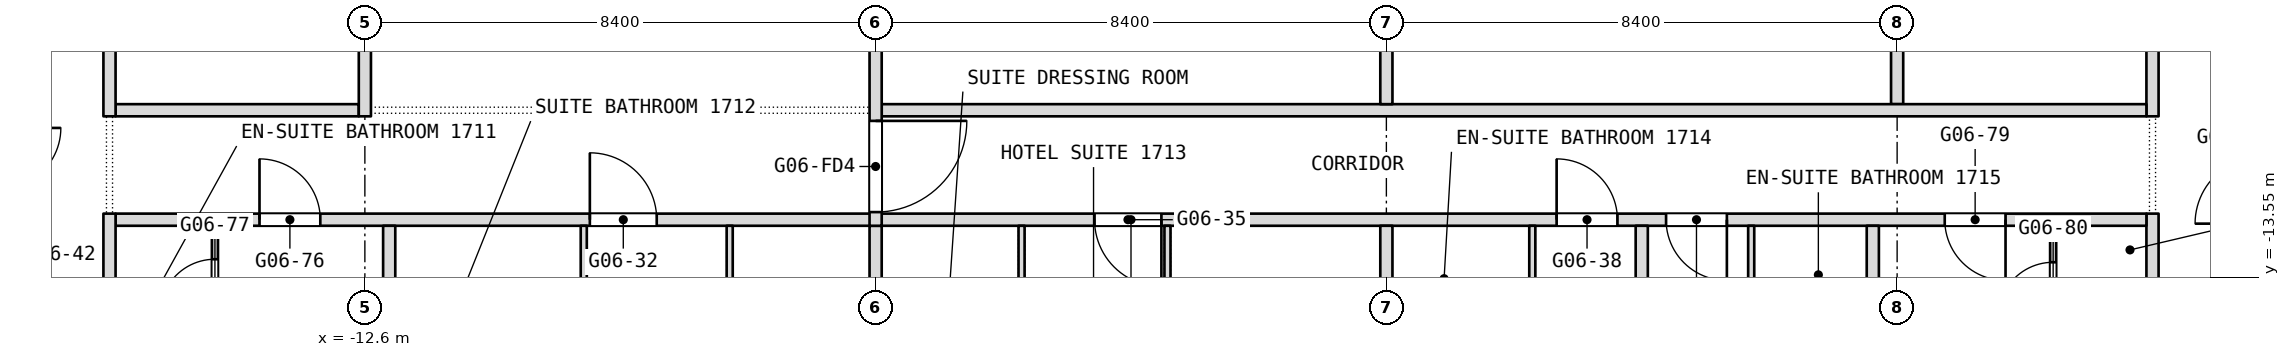
"""IFC4 building model, lengths in metres.
Left out: names, types, materials, properties, quantities, classifications, styles, units other than length and angle.
Written with IfcOpenShell. Run it as: python <this file> out.ifc"""

import sys

from ifc_helpers import new_model, si_unit, direction, frame, frame_2d, origin, place, context, subcontext, project, spatial, rectangle, extrude, element, fill, save


model = new_model("IFC4")
c1 = context("Model", 3, precision=1e-05, world=origin(), true_north=direction((0.0, 1.0)))
c2 = subcontext(c1, "Body", "Model", "MODEL_VIEW")
j1 = project(units=[si_unit("LENGTHUNIT", "METRE"), si_unit("PLANEANGLEUNIT", "RADIAN")], contexts=[c1])
p1 = place(None, origin())
s1 = spatial("IfcSite", under=j1, at=p1, CompositionType="ELEMENT")
p2 = place(p1, origin())
s2 = spatial("IfcBuilding", under=s1, at=p2, CompositionType="ELEMENT")
p3 = place(p2, frame((0.0, 0.0, 76.1)))
s3 = spatial("IfcBuildingStorey", under=s2, at=p3, CompositionType="ELEMENT", Elevation=76.1)
p4 = place(p3, frame((16.8, -17.143, 0.0), z_axis=(0.0, 0.0, 1.0), x_axis=(0.0, 1.0, 0.0)))
e1 = element("IfcWall", 1, at=p4, inside=s3, PredefinedType="PARTITIONING", context=c2, shape_type="SweptSolid", body=[
    extrude(rectangle(XDim=4.643, YDim=0.2, at=frame_2d((2.322, 0.0))), origin(), (0.0, 0.0, 1.0), 3.34),
])
p5 = place(p4, frame((0.772, 0.0, 0.0)))
e2 = element("IfcOpeningElement", 2, at=p5, cuts=e1, PredefinedType="OPENING", context=c2, shape_type="SweptSolid", body=[
    extrude(rectangle(XDim=0.9, YDim=2.1, at=frame_2d((0.45, 1.05))), frame((0.0, 0.1, 0.0), z_axis=(0.0, -1.0, 0.0), x_axis=(1.0, 0.0, 0.0)), (0.0, 0.0, 1.0), 0.2),
])
p6 = place(p3, frame((16.8, -10.9, 0.0), z_axis=(0.0, 0.0, 1.0), x_axis=(0.0, 1.0, 0.0)))
e3 = element("IfcWall", 3, at=p6, inside=s3, PredefinedType="PARTITIONING", context=c2, shape_type="SweptSolid", body=[
    extrude(rectangle(XDim=7.3, YDim=0.2, at=frame_2d((3.65, 0.0))), origin(), (0.0, 0.0, 1.0), 3.34),
])
p7 = place(p6, frame((3.15, 0.0, 0.0)))
e4 = element("IfcOpeningElement", 4, at=p7, cuts=e3, PredefinedType="OPENING", context=c2, shape_type="SweptSolid", body=[
    extrude(rectangle(XDim=1.0, YDim=2.1, at=frame_2d((0.5, 1.05))), frame((0.0, 0.1, 0.0), z_axis=(0.0, -1.0, 0.0), x_axis=(1.0, 0.0, 0.0)), (0.0, 0.0, 1.0), 0.2),
])
p8 = place(p3, frame((15.166, -15.0, 0.0), z_axis=(0.0, 0.0, 1.0), x_axis=(0.0, 1.0, 0.0)))
e5 = element("IfcWall", 5, at=p8, inside=s3, PredefinedType="PARTITIONING", context=c2, shape_type="SweptSolid", body=[
    extrude(rectangle(XDim=2.3, YDim=0.1, at=frame_2d((1.15, 0.0))), origin(), (0.0, 0.0, 1.0), 3.34),
])
p9 = place(p8, frame((0.8, 0.0, 0.0)))
e6 = element("IfcOpeningElement", 6, at=p9, cuts=e5, PredefinedType="OPENING", context=c2, shape_type="SweptSolid", body=[
    extrude(rectangle(XDim=0.9, YDim=2.1, at=frame_2d((0.45, 1.05))), frame((0.0, 0.05, 0.0), z_axis=(0.0, -1.0, 0.0), x_axis=(1.0, 0.0, 0.0)), (0.0, 0.0, 1.0), 0.1),
])
p10 = place(p3, frame((12.6, -10.7, 0.0), z_axis=(0.0, 0.0, 1.0), x_axis=(0.0, 1.0, 0.0)))
e7 = element("IfcWall", 7, at=p10, inside=s3, PredefinedType="PARTITIONING", context=c2, shape_type="SweptSolid", body=[
    extrude(rectangle(XDim=3.6, YDim=0.2, at=frame_2d((1.8, 0.0))), origin(), (0.0, 0.0, 1.0), 3.34),
])
p11 = place(p3, frame((-16.7, -12.6, 0.0), z_axis=(0.0, 0.0, 1.0), x_axis=(1.0, 0.0, 0.0)))
e8 = element("IfcWall", 8, at=p11, inside=s3, PredefinedType="PARTITIONING", context=c2, shape_type="SweptSolid", body=[
    extrude(rectangle(XDim=33.4, YDim=0.2, at=frame_2d((16.7, 0.0))), origin(), (0.0, 0.0, 1.0), 3.34),
])
p12 = place(p11, frame((7.8, 0.0, 0.0)))
e9 = element("IfcOpeningElement", 9, at=p12, cuts=e8, PredefinedType="OPENING", context=c2, shape_type="SweptSolid", body=[
    extrude(rectangle(XDim=1.1, YDim=2.1, at=frame_2d((0.55, 1.05))), frame((0.0, 0.1, 0.0), z_axis=(0.0, -1.0, 0.0), x_axis=(1.0, 0.0, 0.0)), (0.0, 0.0, 1.0), 0.2),
])
p13 = place(p11, frame((16.1, 0.0, 0.0)))
e10 = element("IfcOpeningElement", 10, at=p13, cuts=e8, PredefinedType="OPENING", context=c2, shape_type="SweptSolid", body=[
    extrude(rectangle(XDim=1.1, YDim=2.1, at=frame_2d((0.55, 1.05))), frame((0.0, 0.1, 0.0), z_axis=(0.0, -1.0, 0.0), x_axis=(1.0, 0.0, 0.0)), (0.0, 0.0, 1.0), 0.2),
])
p14 = place(p11, frame((23.7, 0.0, 0.0)))
e11 = element("IfcOpeningElement", 11, at=p14, cuts=e8, PredefinedType="OPENING", context=c2, shape_type="SweptSolid", body=[
    extrude(rectangle(XDim=1.0, YDim=2.1, at=frame_2d((0.5, 1.05))), frame((0.0, 0.1, 0.0), z_axis=(0.0, -1.0, 0.0), x_axis=(1.0, 0.0, 0.0)), (0.0, 0.0, 1.0), 0.2),
])
p15 = place(p11, frame((25.5, 0.0, 0.0)))
e12 = element("IfcOpeningElement", 12, at=p15, cuts=e8, PredefinedType="OPENING", context=c2, shape_type="SweptSolid", body=[
    extrude(rectangle(XDim=1.0, YDim=2.1, at=frame_2d((0.5, 1.05))), frame((0.0, 0.1, 0.0), z_axis=(0.0, -1.0, 0.0), x_axis=(1.0, 0.0, 0.0)), (0.0, 0.0, 1.0), 0.2),
])
p16 = place(p11, frame((2.367, 0.0, 0.0)))
e13 = element("IfcOpeningElement", 13, at=p16, cuts=e8, PredefinedType="OPENING", context=c2, shape_type="SweptSolid", body=[
    extrude(rectangle(XDim=1.0, YDim=2.1, at=frame_2d((0.5, 1.05))), frame((0.0, 0.1, 0.0), z_axis=(0.0, -1.0, 0.0), x_axis=(1.0, 0.0, 0.0)), (0.0, 0.0, 1.0), 0.2),
])
p17 = place(p11, frame((30.083, 0.0, 0.0)))
e14 = element("IfcOpeningElement", 14, at=p17, cuts=e8, PredefinedType="OPENING", context=c2, shape_type="SweptSolid", body=[
    extrude(rectangle(XDim=1.0, YDim=2.1, at=frame_2d((0.5, 1.05))), frame((0.0, 0.1, 0.0), z_axis=(0.0, -1.0, 0.0), x_axis=(1.0, 0.0, 0.0)), (0.0, 0.0, 1.0), 0.2),
])
p18 = place(p3, frame((12.2, -15.325, 0.0), z_axis=(0.0, 0.0, 1.0), x_axis=(0.0, 1.0, 0.0)))
e15 = element("IfcWall", 15, at=p18, inside=s3, PredefinedType="PARTITIONING", context=c2, shape_type="SweptSolid", body=[
    extrude(rectangle(XDim=2.625, YDim=0.2, at=frame_2d((1.312, 0.0))), origin(), (0.0, 0.0, 1.0), 3.34),
])
p19 = place(p3, frame((-16.7, -10.8, 0.0), z_axis=(0.0, 0.0, 1.0), x_axis=(1.0, 0.0, 0.0)))
e16 = element("IfcWall", 16, at=p19, inside=s3, PredefinedType="PARTITIONING", context=c2, shape_type="SweptSolid", body=[
    extrude(rectangle(XDim=4.0, YDim=0.2, at=frame_2d((2.0, 0.0))), origin(), (0.0, 0.0, 1.0), 3.34),
])
p20 = place(p3, frame((-4.1, -10.8, 0.0), z_axis=(0.0, 0.0, 1.0), x_axis=(1.0, 0.0, 0.0)))
e17 = element("IfcWall", 17, at=p20, inside=s3, PredefinedType="PARTITIONING", context=c2, shape_type="SweptSolid", body=[
    extrude(rectangle(XDim=20.8, YDim=0.2, at=frame_2d((10.4, 0.0))), origin(), (0.0, 0.0, 1.0), 3.34),
])
p21 = place(p3, frame((10.2, -15.425, 0.0), z_axis=(0.0, 0.0, 1.0), x_axis=(0.0, 1.0, 0.0)))
e18 = element("IfcWall", 18, at=p21, inside=s3, PredefinedType="PARTITIONING", context=c2, shape_type="SweptSolid", body=[
    extrude(rectangle(XDim=2.725, YDim=0.1, at=frame_2d((1.363, 0.0))), origin(), (0.0, 0.0, 1.0), 3.34),
])
p22 = place(p3, frame((8.4, -17.7, 0.0), z_axis=(0.0, 0.0, 1.0), x_axis=(0.0, 1.0, 0.0)))
e19 = element("IfcWall", 19, at=p22, inside=s3, PredefinedType="PARTITIONING", context=c2, shape_type="SweptSolid", body=[
    extrude(rectangle(XDim=5.0, YDim=0.2, at=frame_2d((2.5, 0.0))), origin(), (0.0, 0.0, 1.0), 3.34),
])
p23 = place(p3, frame((6.6, -15.325, 0.0), z_axis=(0.0, 0.0, 1.0), x_axis=(0.0, 1.0, 0.0)))
e20 = element("IfcWall", 20, at=p23, inside=s3, PredefinedType="PARTITIONING", context=c2, shape_type="SweptSolid", body=[
    extrude(rectangle(XDim=2.625, YDim=0.1, at=frame_2d((1.312, 0.0))), origin(), (0.0, 0.0, 1.0), 3.34),
])
p24 = place(p3, frame((4.2, -17.7, 0.0), z_axis=(0.0, 0.0, 1.0), x_axis=(0.0, 1.0, 0.0)))
e21 = element("IfcWall", 21, at=p24, inside=s3, PredefinedType="PARTITIONING", context=c2, shape_type="SweptSolid", body=[
    extrude(rectangle(XDim=5.0, YDim=0.2, at=frame_2d((2.5, 0.0))), origin(), (0.0, 0.0, 1.0), 3.34),
])
p25 = place(p3, frame((4.2, -10.7, 0.0), z_axis=(0.0, 0.0, 1.0), x_axis=(0.0, 1.0, 0.0)))
e22 = element("IfcWall", 22, at=p25, inside=s3, PredefinedType="PARTITIONING", context=c2, shape_type="SweptSolid", body=[
    extrude(rectangle(XDim=8.8, YDim=0.2, at=frame_2d((4.4, 0.0))), origin(), (0.0, 0.0, 1.0), 3.34),
])
p26 = place(p3, frame((0.6, -16.25, 0.0), z_axis=(0.0, 0.0, 1.0), x_axis=(0.0, 1.0, 0.0)))
e23 = element("IfcWall", 23, at=p26, inside=s3, PredefinedType="PARTITIONING", context=c2, shape_type="SweptSolid", body=[
    extrude(rectangle(XDim=3.55, YDim=0.1, at=frame_2d((1.775, 0.0))), origin(), (0.0, 0.0, 1.0), 3.34),
])
p27 = place(p3, frame((-1.8, -16.15, 0.0), z_axis=(0.0, 0.0, 1.0), x_axis=(0.0, 1.0, 0.0)))
e24 = element("IfcWall", 24, at=p27, inside=s3, PredefinedType="PARTITIONING", context=c2, shape_type="SweptSolid", body=[
    extrude(rectangle(XDim=3.45, YDim=0.1, at=frame_2d((1.725, 0.0))), origin(), (0.0, 0.0, 1.0), 3.34),
])
p28 = place(p3, frame((-4.2, -17.7, 0.0), z_axis=(0.0, 0.0, 1.0), x_axis=(0.0, 1.0, 0.0)))
e25 = element("IfcWall", 25, at=p28, inside=s3, PredefinedType="PARTITIONING", context=c2, shape_type="SweptSolid", body=[
    extrude(rectangle(XDim=5.0, YDim=0.2, at=frame_2d((2.5, 0.0))), origin(), (0.0, 0.0, 1.0), 3.34),
])
p29 = place(p3, frame((-4.2, -12.7, 0.0), z_axis=(0.0, 0.0, 1.0), x_axis=(0.0, 1.0, 0.0)))
e26 = element("IfcWall", 26, at=p29, inside=s3, PredefinedType="PARTITIONING", context=c2, shape_type="SweptSolid", body=[
    extrude(rectangle(XDim=12.7, YDim=0.2, at=frame_2d((6.35, 0.0))), origin(), (0.0, 0.0, 1.0), 3.34),
])
p30 = place(p29, frame((11.05, 0.0, 0.0)))
e27 = element("IfcOpeningElement", 27, at=p30, cuts=e26, PredefinedType="OPENING", context=c2, shape_type="SweptSolid", body=[
    extrude(rectangle(XDim=1.5, YDim=2.1, at=frame_2d((0.75, 1.05))), frame((0.0, 0.1, 0.0), z_axis=(0.0, -1.0, 0.0), x_axis=(1.0, 0.0, 0.0)), (0.0, 0.0, 1.0), 0.2),
])
p31 = place(p29, frame((0.225, 0.0, 0.0)))
e28 = element("IfcOpeningElement", 28, at=p31, cuts=e26, PredefinedType="OPENING", context=c2, shape_type="SweptSolid", body=[
    extrude(rectangle(XDim=1.5, YDim=2.1, at=frame_2d((0.75, 1.05))), frame((0.0, 0.1, 0.0), z_axis=(0.0, -1.0, 0.0), x_axis=(1.0, 0.0, 0.0)), (0.0, 0.0, 1.0), 0.2),
])
p32 = place(p3, frame((-6.6, -16.25, 0.0), z_axis=(0.0, 0.0, 1.0), x_axis=(0.0, 1.0, 0.0)))
e29 = element("IfcWall", 29, at=p32, inside=s3, PredefinedType="PARTITIONING", context=c2, shape_type="SweptSolid", body=[
    extrude(rectangle(XDim=3.55, YDim=0.1, at=frame_2d((1.775, 0.0))), origin(), (0.0, 0.0, 1.0), 3.34),
])
p33 = place(p3, frame((-9.0, -16.15, 0.0), z_axis=(0.0, 0.0, 1.0), x_axis=(0.0, 1.0, 0.0)))
e30 = element("IfcWall", 30, at=p33, inside=s3, PredefinedType="PARTITIONING", context=c2, shape_type="SweptSolid", body=[
    extrude(rectangle(XDim=3.45, YDim=0.1, at=frame_2d((1.725, 0.0))), origin(), (0.0, 0.0, 1.0), 3.34),
])
p34 = place(p33, frame((0.94, 0.0, 0.0)))
e31 = element("IfcOpeningElement", 31, at=p34, cuts=e30, PredefinedType="OPENING", context=c2, shape_type="SweptSolid", body=[
    extrude(rectangle(XDim=0.9, YDim=2.1, at=frame_2d((0.45, 1.05))), frame((0.0, 0.05, 0.0), z_axis=(0.0, -1.0, 0.0), x_axis=(1.0, 0.0, 0.0)), (0.0, 0.0, 1.0), 0.1),
])
p35 = place(p3, frame((-12.2, -16.0, 0.0), z_axis=(0.0, 0.0, 1.0), x_axis=(0.0, 1.0, 0.0)))
e32 = element("IfcWall", 32, at=p35, inside=s3, PredefinedType="PARTITIONING", context=c2, shape_type="SweptSolid", body=[
    extrude(rectangle(XDim=3.3, YDim=0.2, at=frame_2d((1.65, 0.0))), origin(), (0.0, 0.0, 1.0), 3.34),
])
p36 = place(p3, frame((-12.6, -10.9, 0.0), z_axis=(0.0, 0.0, 1.0), x_axis=(0.0, 1.0, 0.0)))
e33 = element("IfcWall", 33, at=p36, inside=s3, PredefinedType="PARTITIONING", context=c2, shape_type="SweptSolid", body=[
    extrude(rectangle(XDim=5.6, YDim=0.2, at=frame_2d((2.8, 0.0))), origin(), (0.0, 0.0, 1.0), 3.34),
])
p37 = place(p3, frame((-15.066, -14.9, 0.0), z_axis=(0.0, 0.0, 1.0), x_axis=(0.0, 1.0, 0.0)))
e34 = element("IfcWall", 34, at=p37, inside=s3, PredefinedType="PARTITIONING", context=c2, shape_type="SweptSolid", body=[
    extrude(rectangle(XDim=2.2, YDim=0.1, at=frame_2d((1.1, 0.0))), origin(), (0.0, 0.0, 1.0), 3.34),
])
p38 = place(p37, frame((0.75, 0.0, 0.0)))
e35 = element("IfcOpeningElement", 35, at=p38, cuts=e34, PredefinedType="OPENING", context=c2, shape_type="SweptSolid", body=[
    extrude(rectangle(XDim=0.9, YDim=2.1, at=frame_2d((0.45, 1.05))), frame((0.0, 0.05, 0.0), z_axis=(0.0, -1.0, 0.0), x_axis=(1.0, 0.0, 0.0)), (0.0, 0.0, 1.0), 0.1),
])
p39 = place(p3, frame((-16.8, -17.143, 0.0), z_axis=(0.0, 0.0, 1.0), x_axis=(0.0, 1.0, 0.0)))
e36 = element("IfcWall", 36, at=p39, inside=s3, PredefinedType="PARTITIONING", context=c2, shape_type="SweptSolid", body=[
    extrude(rectangle(XDim=4.643, YDim=0.2, at=frame_2d((2.322, 0.0))), origin(), (0.0, 0.0, 1.0), 3.34),
])
p40 = place(p39, frame((0.772, 0.0, 0.0)))
e37 = element("IfcOpeningElement", 37, at=p40, cuts=e36, PredefinedType="OPENING", context=c2, shape_type="SweptSolid", body=[
    extrude(rectangle(XDim=0.9, YDim=2.1, at=frame_2d((0.45, 1.05))), frame((0.0, 0.1, 0.0), z_axis=(0.0, -1.0, 0.0), x_axis=(1.0, 0.0, 0.0)), (0.0, 0.0, 1.0), 0.2),
])
p41 = place(p3, frame((-16.8, -10.9, 0.0), z_axis=(0.0, 0.0, 1.0), x_axis=(0.0, 1.0, 0.0)))
e38 = element("IfcWall", 38, at=p41, inside=s3, PredefinedType="PARTITIONING", context=c2, shape_type="SweptSolid", body=[
    extrude(rectangle(XDim=9.0, YDim=0.2, at=frame_2d((4.5, 0.0))), origin(), (0.0, 0.0, 1.0), 3.34),
])
p42 = place(p9, origin())
e39 = element("IfcDoor", 39, at=p42, inside=s3, OperationType="SINGLE_SWING_RIGHT", PredefinedType="DOOR", context=c2, shape_type="SweptSolid", body=[
    extrude(rectangle(XDim=0.9, YDim=2.1, at=frame_2d((0.45, 1.05))), frame((0.0, 0.025, 0.0), z_axis=(0.0, -1.0, 0.0), x_axis=(1.0, 0.0, 0.0)), (0.0, 0.0, 1.0), 0.05),
])
fill(e6, e39)
p43 = place(p12, origin())
e40 = element("IfcDoor", 40, at=p43, inside=s3, OperationType="SINGLE_SWING_RIGHT", PredefinedType="DOOR", context=c2, shape_type="SweptSolid", body=[
    extrude(rectangle(XDim=1.1, YDim=2.1, at=frame_2d((0.55, 1.05))), frame((0.0, 0.025, 0.0), z_axis=(0.0, -1.0, 0.0), x_axis=(1.0, 0.0, 0.0)), (0.0, 0.0, 1.0), 0.05),
])
fill(e9, e40)
p44 = place(p13, origin())
e41 = element("IfcDoor", 41, at=p44, inside=s3, OperationType="SINGLE_SWING_LEFT", PredefinedType="DOOR", context=c2, shape_type="SweptSolid", body=[
    extrude(rectangle(XDim=1.1, YDim=2.1, at=frame_2d((0.55, 1.05))), frame((0.0, 0.025, 0.0), z_axis=(0.0, -1.0, 0.0), x_axis=(1.0, 0.0, 0.0)), (0.0, 0.0, 1.0), 0.05),
])
fill(e10, e41)
p45 = place(p14, origin())
e42 = element("IfcDoor", 42, at=p45, inside=s3, OperationType="SINGLE_SWING_RIGHT", PredefinedType="DOOR", context=c2, shape_type="SweptSolid", body=[
    extrude(rectangle(XDim=1.0, YDim=2.1, at=frame_2d((0.5, 1.05))), frame((0.0, 0.025, 0.0), z_axis=(0.0, -1.0, 0.0), x_axis=(1.0, 0.0, 0.0)), (0.0, 0.0, 1.0), 0.05),
])
fill(e11, e42)
p46 = place(p15, origin())
e43 = element("IfcDoor", 43, at=p46, inside=s3, OperationType="SINGLE_SWING_RIGHT", PredefinedType="DOOR", context=c2, shape_type="SweptSolid", body=[
    extrude(rectangle(XDim=1.0, YDim=2.1, at=frame_2d((0.5, 1.05))), frame((0.0, 0.025, 0.0), z_axis=(0.0, -1.0, 0.0), x_axis=(1.0, 0.0, 0.0)), (0.0, 0.0, 1.0), 0.05),
])
fill(e12, e43)
p47 = place(p16, origin())
e44 = element("IfcDoor", 44, at=p47, inside=s3, OperationType="SINGLE_SWING_RIGHT", PredefinedType="DOOR", context=c2, shape_type="SweptSolid", body=[
    extrude(rectangle(XDim=1.0, YDim=2.1, at=frame_2d((0.5, 1.05))), frame((0.0, 0.025, 0.0), z_axis=(0.0, -1.0, 0.0), x_axis=(1.0, 0.0, 0.0)), (0.0, 0.0, 1.0), 0.05),
])
fill(e13, e44)
p48 = place(p17, origin())
e45 = element("IfcDoor", 45, at=p48, inside=s3, OperationType="SINGLE_SWING_LEFT", PredefinedType="DOOR", context=c2, shape_type="SweptSolid", body=[
    extrude(rectangle(XDim=1.0, YDim=2.1, at=frame_2d((0.5, 1.05))), frame((0.0, 0.025, 0.0), z_axis=(0.0, -1.0, 0.0), x_axis=(1.0, 0.0, 0.0)), (0.0, 0.0, 1.0), 0.05),
])
fill(e14, e45)
p49 = place(p38, origin())
e46 = element("IfcDoor", 46, at=p49, inside=s3, OperationType="SINGLE_SWING_RIGHT", PredefinedType="DOOR", context=c2, shape_type="SweptSolid", body=[
    extrude(rectangle(XDim=0.9, YDim=2.1, at=frame_2d((0.45, 1.05))), frame((0.0, 0.025, 0.0), z_axis=(0.0, -1.0, 0.0), x_axis=(1.0, 0.0, 0.0)), (0.0, 0.0, 1.0), 0.05),
])
fill(e35, e46)
p50 = place(p31, origin())
e47 = element("IfcDoor", 47, at=p50, inside=s3, OperationType="DOUBLE_DOOR_DOUBLE_SWING", PredefinedType="DOOR", context=c2, shape_type="SweptSolid", body=[
    extrude(rectangle(XDim=1.5, YDim=2.1, at=frame_2d((0.75, 1.05))), frame((0.0, 0.025, 0.0), z_axis=(0.0, -1.0, 0.0), x_axis=(1.0, 0.0, 0.0)), (0.0, 0.0, 1.0), 0.05),
])
fill(e28, e47)
save(model, sys.argv[1])
